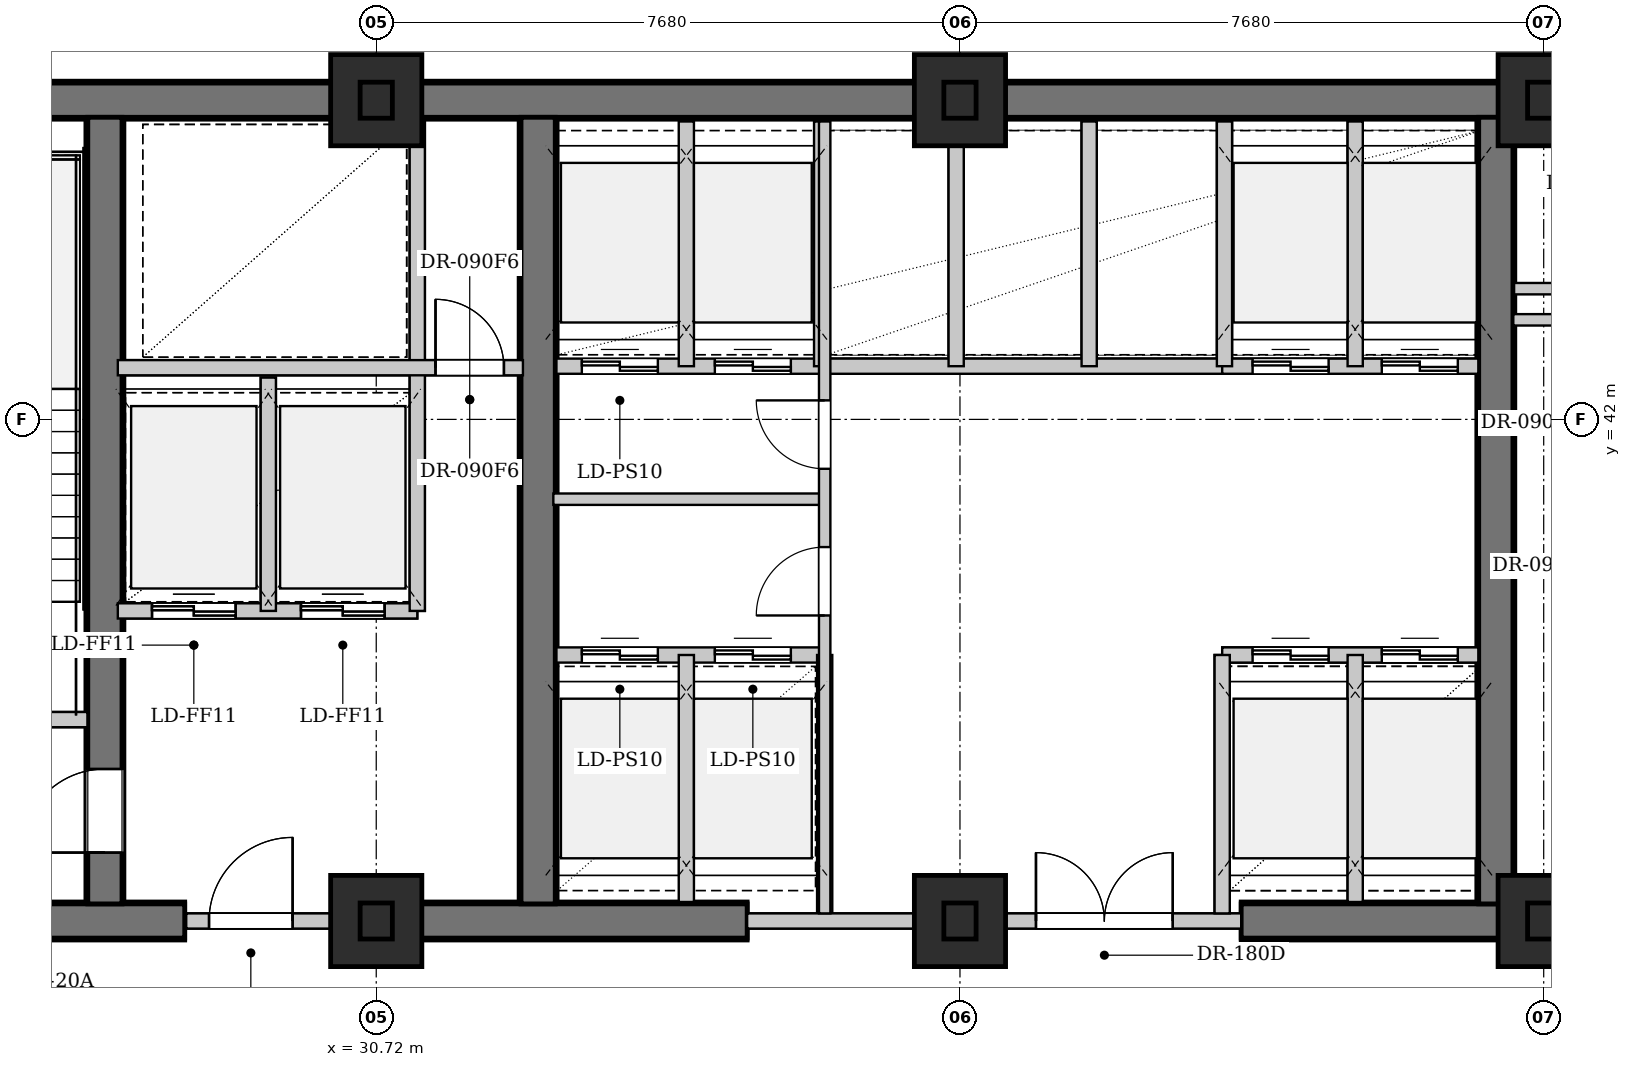
"""IFC4 building model, lengths in metres.
Left out: names, types, materials, properties, quantities, classifications, styles, units other than length and angle.
Written with IfcOpenShell. Run it as: python <this file> out.ifc"""

import sys

from ifc_helpers import new_model, si_unit, direction, frame, frame_2d, origin, origin_2d, place, context, subcontext, project, spatial, rectangle, extrude, element, fill, save


model = new_model("IFC4")
c1 = context("Model", 3, precision=1e-05, world=origin(), true_north=direction((0.0, 1.0)))
c2 = subcontext(c1, "Body", "Model", "MODEL_VIEW")
j1 = project(units=[si_unit("LENGTHUNIT", "METRE"), si_unit("PLANEANGLEUNIT", "RADIAN")], contexts=[c1])
p1 = place(None, origin())
s1 = spatial("IfcSite", under=j1, at=p1, CompositionType="ELEMENT")
p2 = place(p1, origin())
s2 = spatial("IfcBuilding", under=s1, at=p2, CompositionType="ELEMENT")
p3 = place(p2, frame((0.0, 0.0, 78.0)))
s3 = spatial("IfcBuildingStorey", under=s2, at=p3, CompositionType="ELEMENT", Elevation=78.0)
p4 = place(p3, frame((22.79, 46.2, 0.0), z_axis=(0.0, 0.0, 1.0), x_axis=(1.0, 0.0, 0.0)))
e1 = element("IfcWall", 1, at=p4, inside=s3, PredefinedType="SHEAR", context=c2, shape_type="SweptSolid", body=[
    extrude(rectangle(XDim=31.22, YDim=0.5, at=frame_2d((15.61, 0.0))), origin(), (0.0, 0.0, 1.0), 3.68),
])
p5 = place(p3, frame((22.79, 35.4, 0.0), z_axis=(0.0, 0.0, 1.0), x_axis=(1.0, 0.0, 0.0)))
e2 = element("IfcWall", 2, at=p5, inside=s3, PredefinedType="SHEAR", context=c2, shape_type="SweptSolid", body=[
    extrude(rectangle(XDim=5.41, YDim=0.5, at=frame_2d((2.705, 0.0))), origin(), (0.0, 0.0, 1.0), 3.68),
])
p6 = place(p3, frame((30.72, 35.4, 0.0), z_axis=(0.0, 0.0, 1.0), x_axis=(1.0, 0.0, 0.0)))
e3 = element("IfcWall", 3, at=p6, inside=s3, PredefinedType="SHEAR", context=c2, shape_type="SweptSolid", body=[
    extrude(rectangle(XDim=4.88, YDim=0.5, at=frame_2d((2.44, 0.0))), origin(), (0.0, 0.0, 1.0), 3.68),
])
p7 = place(p3, frame((42.1, 35.4, 0.0), z_axis=(0.0, 0.0, 1.0), x_axis=(1.0, 0.0, 0.0)))
e4 = element("IfcWall", 4, at=p7, inside=s3, PredefinedType="SHEAR", context=c2, shape_type="SweptSolid", body=[
    extrude(rectangle(XDim=8.05, YDim=0.5, at=frame_2d((4.025, 0.0))), origin(), (0.0, 0.0, 1.0), 3.68),
])
p8 = place(p7, frame((4.85, 0.0, 0.0)))
e5 = element("IfcOpeningElement", 5, at=p8, cuts=e4, PredefinedType="OPENING", context=c2, shape_type="SweptSolid", body=[
    extrude(rectangle(XDim=0.9, YDim=2.15, at=frame_2d((0.45, 1.075))), frame((0.0, 0.26, 0.0), z_axis=(0.0, -1.0, 0.0), x_axis=(1.0, 0.0, 0.0)), (0.0, 0.0, 1.0), 0.52),
])
p9 = place(p3, frame((27.15, 35.65, 0.0), z_axis=(0.0, 0.0, 1.0), x_axis=(0.0, 1.0, 0.0)))
e6 = element("IfcWall", 6, at=p9, inside=s3, PredefinedType="SHEAR", context=c2, shape_type="SweptSolid", body=[
    extrude(rectangle(XDim=10.3, YDim=0.5, at=frame_2d((5.15, 0.0))), origin(), (0.0, 0.0, 1.0), 3.68),
])
p10 = place(p9, frame((0.65, 0.0, 0.0)))
e7 = element("IfcOpeningElement", 7, at=p10, cuts=e6, PredefinedType="OPENING", context=c2, shape_type="SweptSolid", body=[
    extrude(rectangle(XDim=1.1, YDim=2.15, at=frame_2d((0.55, 1.075))), frame((0.0, 0.26, 0.0), z_axis=(0.0, -1.0, 0.0), x_axis=(1.0, 0.0, 0.0)), (0.0, 0.0, 1.0), 0.52),
])
for number, where, z_axis, x_axis in (
    (8, (32.85, 35.65, 0.0), (0.0, 0.0, 1.0), (0.0, 1.0, 0.0)),
    (9, (45.45, 35.65, 0.0), (0.0, 0.0, 1.0), (0.0, 1.0, 0.0)),
):
    element("IfcWall", number, at=place(p3, frame(where, z_axis=z_axis, x_axis=x_axis)), inside=s3, PredefinedType="SHEAR", context=c2, shape_type="SweptSolid", body=[
        extrude(rectangle(XDim=10.3, YDim=0.5, at=frame_2d((5.15, 0.0))), origin(), (0.0, 0.0, 1.0), 3.68),
    ])
for number, where, z_axis, x_axis in (
    (10, (30.72, 35.4, 0.0), (0.0, 0.0, 1.0), (1.0, 0.0, 0.0)),
    (11, (30.72, 46.2, 0.0), (0.0, 0.0, 1.0), (1.0, 0.0, 0.0)),
    (12, (38.4, 35.4, 0.0), (0.0, 0.0, 1.0), (1.0, 0.0, 0.0)),
    (13, (38.4, 46.2, 0.0), (0.0, 0.0, 1.0), (1.0, 0.0, 0.0)),
    (14, (46.08, 35.4, 0.0), (0.0, 0.0, 1.0), (1.0, 0.0, 0.0)),
    (15, (46.08, 46.2, 0.0), (0.0, 0.0, 1.0), (1.0, 0.0, 0.0)),
):
    element("IfcColumn", number, at=place(p3, frame(where, z_axis=z_axis, x_axis=x_axis)), inside=s3, PredefinedType="COLUMN", context=c2, shape_type="SweptSolid", body=[
        extrude(rectangle(XDim=1.2, YDim=1.2, at=origin_2d()), origin(), (0.0, 0.0, 1.0), 3.9),
    ])
p11 = place(p3, frame((23.3, 38.05, 0.0), z_axis=(0.0, 0.0, 1.0), x_axis=(1.0, 0.0, 0.0)))
e16 = element("IfcWall", 16, at=p11, inside=s3, PredefinedType="PARTITIONING", context=c2, shape_type="SweptSolid", body=[
    extrude(rectangle(XDim=3.62, YDim=0.2, at=frame_2d((1.81, 0.0))), origin(), (0.0, 0.0, 1.0), 3.68),
])
p12 = place(p11, frame((1.26, 0.0, 0.0)))
e17 = element("IfcOpeningElement", 17, at=p12, cuts=e16, PredefinedType="OPENING", context=c2, shape_type="SweptSolid", body=[
    extrude(rectangle(XDim=1.1, YDim=2.15, at=frame_2d((0.55, 1.075))), frame((0.0, 0.11, 0.0), z_axis=(0.0, -1.0, 0.0), x_axis=(1.0, 0.0, 0.0)), (0.0, 0.0, 1.0), 0.22),
])
p13 = place(p3, frame((28.22, 35.4, 0.0), z_axis=(0.0, 0.0, 1.0), x_axis=(1.0, 0.0, 0.0)))
e18 = element("IfcWall", 18, at=p13, inside=s3, PredefinedType="PARTITIONING", context=c2, shape_type="SweptSolid", body=[
    extrude(rectangle(XDim=2.5, YDim=0.2, at=frame_2d((1.25, 0.0))), origin(), (0.0, 0.0, 1.0), 2.765),
])
p14 = place(p13, frame((0.3, 0.0, 0.0)))
e19 = element("IfcOpeningElement", 19, at=p14, cuts=e18, PredefinedType="OPENING", context=c2, shape_type="SweptSolid", body=[
    extrude(rectangle(XDim=1.1, YDim=2.15, at=frame_2d((0.55, 1.075))), frame((0.0, 0.11, 0.0), z_axis=(0.0, -1.0, 0.0), x_axis=(1.0, 0.0, 0.0)), (0.0, 0.0, 1.0), 0.22),
])
p15 = place(p3, frame((27.32, 39.48, 0.0), z_axis=(0.0, 0.0, 1.0), x_axis=(1.0, 0.0, 0.0)))
e20 = element("IfcWall", 20, at=p15, inside=s3, PredefinedType="PARTITIONING", context=c2, shape_type="SweptSolid", body=[
    extrude(rectangle(XDim=3.94, YDim=0.2, at=frame_2d((1.97, 0.0))), origin(), (0.0, 0.0, 1.0), 3.68),
])
p16 = place(p15, frame((0.45, 0.0, 0.0)))
e21 = element("IfcOpeningElement", 21, at=p16, cuts=e20, PredefinedType="OPENING", context=c2, shape_type="SweptSolid", body=[
    extrude(rectangle(XDim=1.1, YDim=2.2, at=frame_2d((0.55, 1.1))), frame((0.0, 0.11, 0.0), z_axis=(0.0, -1.0, 0.0), x_axis=(1.0, 0.0, 0.0)), (0.0, 0.0, 1.0), 0.22),
])
p17 = place(p15, frame((2.41, 0.0, 0.0)))
e22 = element("IfcOpeningElement", 22, at=p17, cuts=e20, PredefinedType="OPENING", context=c2, shape_type="SweptSolid", body=[
    extrude(rectangle(XDim=1.1, YDim=2.2, at=frame_2d((0.55, 1.1))), frame((0.0, 0.11, 0.0), z_axis=(0.0, -1.0, 0.0), x_axis=(1.0, 0.0, 0.0)), (0.0, 0.0, 1.0), 0.22),
])
p18 = place(p3, frame((29.3, 39.48, 0.0), z_axis=(0.0, 0.0, 1.0), x_axis=(0.0, 1.0, 0.0)))
e23 = element("IfcWall", 23, at=p18, inside=s3, PredefinedType="PARTITIONING", context=c2, shape_type="SweptSolid", body=[
    extrude(rectangle(XDim=3.07, YDim=0.2, at=frame_2d((1.535, 0.0))), origin(), (0.0, 0.0, 1.0), 3.68),
])
p19 = place(p3, frame((31.26, 39.48, 0.0), z_axis=(0.0, 0.0, 1.0), x_axis=(0.0, 1.0, 0.0)))
e24 = element("IfcWall", 24, at=p19, inside=s3, PredefinedType="PARTITIONING", context=c2, shape_type="SweptSolid", body=[
    extrude(rectangle(XDim=6.44, YDim=0.2, at=frame_2d((3.22, 0.0))), origin(), (0.0, 0.0, 1.0), 3.68),
])
p20 = place(p3, frame((27.32, 42.68, 0.0), z_axis=(0.0, 0.0, 1.0), x_axis=(1.0, 0.0, 0.0)))
e25 = element("IfcWall", 25, at=p20, inside=s3, PredefinedType="PARTITIONING", context=c2, shape_type="SweptSolid", body=[
    extrude(rectangle(XDim=5.33, YDim=0.2, at=frame_2d((2.665, 0.0))), origin(), (0.0, 0.0, 1.0), 3.68),
])
p21 = place(p20, frame((4.18, 0.0, 0.0)))
e26 = element("IfcOpeningElement", 26, at=p21, cuts=e25, PredefinedType="OPENING", context=c2, shape_type="SweptSolid", body=[
    extrude(rectangle(XDim=0.9, YDim=2.15, at=frame_2d((0.45, 1.075))), frame((0.0, 0.11, 0.0), z_axis=(0.0, -1.0, 0.0), x_axis=(1.0, 0.0, 0.0)), (0.0, 0.0, 1.0), 0.22),
])
p22 = place(p3, frame((35.6, 35.4, 0.0), z_axis=(0.0, 0.0, 1.0), x_axis=(1.0, 0.0, 0.0)))
e27 = element("IfcWall", 27, at=p22, inside=s3, PredefinedType="PARTITIONING", context=c2, shape_type="SweptSolid", body=[
    extrude(rectangle(XDim=6.5, YDim=0.2, at=frame_2d((3.25, 0.0))), origin(), (0.0, 0.0, 1.0), 2.765),
])
p23 = place(p22, frame((3.8, 0.0, 0.0)))
e28 = element("IfcOpeningElement", 28, at=p23, cuts=e27, PredefinedType="OPENING", context=c2, shape_type="SweptSolid", body=[
    extrude(rectangle(XDim=1.8, YDim=2.3, at=frame_2d((0.9, 1.15))), frame((0.0, 0.11, 0.0), z_axis=(0.0, -1.0, 0.0), x_axis=(1.0, 0.0, 0.0)), (0.0, 0.0, 1.0), 0.22),
])
p24 = place(p3, frame((36.6, 42.7, 0.0), z_axis=(0.0, 0.0, 1.0), x_axis=(1.0, 0.0, 0.0)))
e29 = element("IfcWall", 29, at=p24, inside=s3, PredefinedType="PARTITIONING", context=c2, shape_type="SweptSolid", body=[
    extrude(rectangle(XDim=5.25, YDim=0.2, at=frame_2d((2.625, 0.0))), origin(), (0.0, 0.0, 1.0), 3.68),
])
p25 = place(p3, frame((38.35, 42.7, 0.0), z_axis=(0.0, 0.0, 1.0), x_axis=(0.0, 1.0, 0.0)))
e30 = element("IfcWall", 30, at=p25, inside=s3, PredefinedType="PARTITIONING", context=c2, shape_type="SweptSolid", body=[
    extrude(rectangle(XDim=3.22, YDim=0.2, at=frame_2d((1.61, 0.0))), origin(), (0.0, 0.0, 1.0), 2.765),
])
p26 = place(p3, frame((40.1, 42.7, 0.0), z_axis=(0.0, 0.0, 1.0), x_axis=(0.0, 1.0, 0.0)))
e31 = element("IfcWall", 31, at=p26, inside=s3, PredefinedType="PARTITIONING", context=c2, shape_type="SweptSolid", body=[
    extrude(rectangle(XDim=3.22, YDim=0.2, at=frame_2d((1.61, 0.0))), origin(), (0.0, 0.0, 1.0), 3.68),
])
p27 = place(p3, frame((33.05, 38.9, 0.0), z_axis=(0.0, 0.0, 1.0), x_axis=(1.0, 0.0, 0.0)))
e32 = element("IfcWall", 32, at=p27, inside=s3, PredefinedType="PARTITIONING", context=c2, shape_type="SweptSolid", body=[
    extrude(rectangle(XDim=3.57, YDim=0.2, at=frame_2d((1.785, 0.0))), origin(), (0.0, 0.0, 1.0), 3.68),
])
p28 = place(p27, frame((0.375, 0.0, 0.0)))
e33 = element("IfcOpeningElement", 33, at=p28, cuts=e32, PredefinedType="OPENING", context=c2, shape_type="SweptSolid", body=[
    extrude(rectangle(XDim=1.0, YDim=2.2, at=frame_2d((0.5, 1.1))), frame((0.0, 0.11, 0.0), z_axis=(0.0, -1.0, 0.0), x_axis=(1.0, 0.0, 0.0)), (0.0, 0.0, 1.0), 0.22),
])
p29 = place(p27, frame((2.125, 0.0, 0.0)))
e34 = element("IfcOpeningElement", 34, at=p29, cuts=e32, PredefinedType="OPENING", context=c2, shape_type="SweptSolid", body=[
    extrude(rectangle(XDim=1.0, YDim=2.2, at=frame_2d((0.5, 1.1))), frame((0.0, 0.11, 0.0), z_axis=(0.0, -1.0, 0.0), x_axis=(1.0, 0.0, 0.0)), (0.0, 0.0, 1.0), 0.22),
])
p30 = place(p3, frame((33.05, 42.7, 0.0), z_axis=(0.0, 0.0, 1.0), x_axis=(1.0, 0.0, 0.0)))
e35 = element("IfcWall", 35, at=p30, inside=s3, PredefinedType="PARTITIONING", context=c2, shape_type="SweptSolid", body=[
    extrude(rectangle(XDim=3.57, YDim=0.2, at=frame_2d((1.785, 0.0))), origin(), (0.0, 0.0, 1.0), 3.68),
])
p31 = place(p30, frame((0.375, 0.0, 0.0)))
e36 = element("IfcOpeningElement", 36, at=p31, cuts=e35, PredefinedType="OPENING", context=c2, shape_type="SweptSolid", body=[
    extrude(rectangle(XDim=1.0, YDim=2.2, at=frame_2d((0.5, 1.1))), frame((0.0, 0.11, 0.0), z_axis=(0.0, -1.0, 0.0), x_axis=(1.0, 0.0, 0.0)), (0.0, 0.0, 1.0), 0.22),
])
p32 = place(p30, frame((2.125, 0.0, 0.0)))
e37 = element("IfcOpeningElement", 37, at=p32, cuts=e35, PredefinedType="OPENING", context=c2, shape_type="SweptSolid", body=[
    extrude(rectangle(XDim=1.0, YDim=2.2, at=frame_2d((0.5, 1.1))), frame((0.0, 0.11, 0.0), z_axis=(0.0, -1.0, 0.0), x_axis=(1.0, 0.0, 0.0)), (0.0, 0.0, 1.0), 0.22),
])
p33 = place(p3, frame((34.8, 35.65, 0.0), z_axis=(0.0, 0.0, 1.0), x_axis=(0.0, 1.0, 0.0)))
e38 = element("IfcWall", 38, at=p33, inside=s3, PredefinedType="PARTITIONING", context=c2, shape_type="SweptSolid", body=[
    extrude(rectangle(XDim=3.25, YDim=0.2, at=frame_2d((1.625, 0.0))), origin(), (0.0, 0.0, 1.0), 3.68),
])
p34 = place(p3, frame((34.8, 42.7, 0.0), z_axis=(0.0, 0.0, 1.0), x_axis=(0.0, 1.0, 0.0)))
e39 = element("IfcWall", 39, at=p34, inside=s3, PredefinedType="PARTITIONING", context=c2, shape_type="SweptSolid", body=[
    extrude(rectangle(XDim=3.22, YDim=0.2, at=frame_2d((1.61, 0.0))), origin(), (0.0, 0.0, 1.0), 3.68),
])
p35 = place(p3, frame((36.62, 35.5, 0.0), z_axis=(0.0, 0.0, 1.0), x_axis=(0.0, 1.0, 0.0)))
e40 = element("IfcWall", 40, at=p35, inside=s3, PredefinedType="PARTITIONING", context=c2, shape_type="SweptSolid", body=[
    extrude(rectangle(XDim=3.4, YDim=0.2, at=frame_2d((1.7, 0.0))), origin(), (0.0, 0.0, 1.0), 3.68),
])
p36 = place(p3, frame((36.58, 42.7, 0.0), z_axis=(0.0, 0.0, 1.0), x_axis=(0.0, 1.0, 0.0)))
e41 = element("IfcWall", 41, at=p36, inside=s3, PredefinedType="PARTITIONING", context=c2, shape_type="SweptSolid", body=[
    extrude(rectangle(XDim=3.22, YDim=0.2, at=frame_2d((1.61, 0.0))), origin(), (0.0, 0.0, 1.0), 3.68),
])
for number, where, z_axis, x_axis in (
    (42, (41.85, 38.9, 0.0), (0.0, 0.0, 1.0), (1.0, 0.0, 0.0)),
    (43, (41.85, 42.7, 0.0), (0.0, 0.0, 1.0), (1.0, 0.0, 0.0)),
):
    element("IfcWall", number, at=place(p3, frame(where, z_axis=z_axis, x_axis=x_axis)), inside=s3, PredefinedType="PARTITIONING", context=c2, shape_type="SweptSolid", body=[
        extrude(rectangle(XDim=3.37, YDim=0.2, at=frame_2d((1.685, 0.0))), origin(), (0.0, 0.0, 1.0), 3.68),
    ])
p37 = place(p3, frame((43.6, 35.65, 0.0), z_axis=(0.0, 0.0, 1.0), x_axis=(0.0, 1.0, 0.0)))
e44 = element("IfcWall", 44, at=p37, inside=s3, PredefinedType="PARTITIONING", context=c2, shape_type="SweptSolid", body=[
    extrude(rectangle(XDim=3.25, YDim=0.2, at=frame_2d((1.625, 0.0))), origin(), (0.0, 0.0, 1.0), 3.68),
])
p38 = place(p3, frame((43.6, 42.7, 0.0), z_axis=(0.0, 0.0, 1.0), x_axis=(0.0, 1.0, 0.0)))
e45 = element("IfcWall", 45, at=p38, inside=s3, PredefinedType="PARTITIONING", context=c2, shape_type="SweptSolid", body=[
    extrude(rectangle(XDim=3.22, YDim=0.2, at=frame_2d((1.61, 0.0))), origin(), (0.0, 0.0, 1.0), 3.68),
])
p39 = place(p3, frame((41.85, 35.5, 0.0), z_axis=(0.0, 0.0, 1.0), x_axis=(0.0, 1.0, 0.0)))
e46 = element("IfcWall", 46, at=p39, inside=s3, PredefinedType="PARTITIONING", context=c2, shape_type="SweptSolid", body=[
    extrude(rectangle(XDim=3.4, YDim=0.2, at=frame_2d((1.7, 0.0))), origin(), (0.0, 0.0, 1.0), 3.68),
])
p40 = place(p3, frame((41.88, 42.7, 0.0), z_axis=(0.0, 0.0, 1.0), x_axis=(0.0, 1.0, 0.0)))
e47 = element("IfcWall", 47, at=p40, inside=s3, PredefinedType="PARTITIONING", context=c2, shape_type="SweptSolid", body=[
    extrude(rectangle(XDim=3.22, YDim=0.2, at=frame_2d((1.61, 0.0))), origin(), (0.0, 0.0, 1.0), 3.68),
])
p41 = place(p3, frame((45.68, 43.72, 0.0), z_axis=(0.0, 0.0, 1.0), x_axis=(1.0, 0.0, 0.0)))
e48 = element("IfcWall", 48, at=p41, inside=s3, PredefinedType="PARTITIONING", context=c2, shape_type="SweptSolid", body=[
    extrude(rectangle(XDim=4.5, YDim=0.15, at=frame_2d((2.25, 0.0))), origin(), (0.0, 0.0, 1.0), 3.68),
])
p42 = place(p41, frame((0.55, 0.0, 0.0)))
e49 = element("IfcOpeningElement", 49, at=p42, cuts=e48, PredefinedType="OPENING", context=c2, shape_type="SweptSolid", body=[
    extrude(rectangle(XDim=0.95, YDim=2.15, at=frame_2d((0.475, 1.075))), frame((0.0, 0.085, 0.0), z_axis=(0.0, -1.0, 0.0), x_axis=(1.0, 0.0, 0.0)), (0.0, 0.0, 1.0), 0.17),
])
p43 = place(p14, origin())
e50 = element("IfcDoor", 50, at=p43, inside=s3, OperationType="SINGLE_SWING_RIGHT", PredefinedType="DOOR", context=c2, shape_type="SweptSolid", body=[
    extrude(rectangle(XDim=1.1, YDim=2.15, at=frame_2d((0.55, 1.075))), frame((0.0, 0.025, 0.0), z_axis=(0.0, -1.0, 0.0), x_axis=(1.0, 0.0, 0.0)), (0.0, 0.0, 1.0), 0.05),
])
fill(e19, e50)
p44 = place(p16, origin())
e51 = element("IfcDoor", 51, at=p44, inside=s3, OperationType="DOUBLE_DOOR_SLIDING", PredefinedType="DOOR", context=c2, shape_type="SweptSolid", body=[
    extrude(rectangle(XDim=1.1, YDim=2.2, at=frame_2d((0.55, 1.1))), frame((0.0, 0.025, 0.0), z_axis=(0.0, -1.0, 0.0), x_axis=(1.0, 0.0, 0.0)), (0.0, 0.0, 1.0), 0.05),
])
fill(e21, e51)
p45 = place(p17, origin())
e52 = element("IfcDoor", 52, at=p45, inside=s3, OperationType="DOUBLE_DOOR_SLIDING", PredefinedType="DOOR", context=c2, shape_type="SweptSolid", body=[
    extrude(rectangle(XDim=1.1, YDim=2.2, at=frame_2d((0.55, 1.1))), frame((0.0, 0.025, 0.0), z_axis=(0.0, -1.0, 0.0), x_axis=(1.0, 0.0, 0.0)), (0.0, 0.0, 1.0), 0.05),
])
fill(e22, e52)
p46 = place(p21, origin())
e53 = element("IfcDoor", 53, at=p46, inside=s3, OperationType="SINGLE_SWING_LEFT", PredefinedType="DOOR", context=c2, shape_type="SweptSolid", body=[
    extrude(rectangle(XDim=0.9, YDim=2.15, at=frame_2d((0.45, 1.075))), frame((0.0, 0.025, 0.0), z_axis=(0.0, -1.0, 0.0), x_axis=(1.0, 0.0, 0.0)), (0.0, 0.0, 1.0), 0.05),
])
fill(e26, e53)
p47 = place(p23, origin())
e54 = element("IfcDoor", 54, at=p47, inside=s3, OperationType="DOUBLE_DOOR_SINGLE_SWING", PredefinedType="DOOR", context=c2, shape_type="SweptSolid", body=[
    extrude(rectangle(XDim=1.8, YDim=2.3, at=frame_2d((0.9, 1.15))), frame((0.0, 0.025, 0.0), z_axis=(0.0, -1.0, 0.0), x_axis=(1.0, 0.0, 0.0)), (0.0, 0.0, 1.0), 0.05),
])
fill(e28, e54)
p48 = place(p28, origin())
e55 = element("IfcDoor", 55, at=p48, inside=s3, OperationType="DOUBLE_DOOR_SLIDING", PredefinedType="DOOR", context=c2, shape_type="SweptSolid", body=[
    extrude(rectangle(XDim=1.0, YDim=2.2, at=frame_2d((0.5, 1.1))), frame((0.0, 0.025, 0.0), z_axis=(0.0, -1.0, 0.0), x_axis=(1.0, 0.0, 0.0)), (0.0, 0.0, 1.0), 0.05),
])
fill(e33, e55)
p49 = place(p29, origin())
e56 = element("IfcDoor", 56, at=p49, inside=s3, OperationType="DOUBLE_DOOR_SLIDING", PredefinedType="DOOR", context=c2, shape_type="SweptSolid", body=[
    extrude(rectangle(XDim=1.0, YDim=2.2, at=frame_2d((0.5, 1.1))), frame((0.0, 0.025, 0.0), z_axis=(0.0, -1.0, 0.0), x_axis=(1.0, 0.0, 0.0)), (0.0, 0.0, 1.0), 0.05),
])
fill(e34, e56)
p50 = place(p31, origin())
e57 = element("IfcDoor", 57, at=p50, inside=s3, OperationType="DOUBLE_DOOR_SLIDING", PredefinedType="DOOR", context=c2, shape_type="SweptSolid", body=[
    extrude(rectangle(XDim=1.0, YDim=2.2, at=frame_2d((0.5, 1.1))), frame((0.0, 0.025, 0.0), z_axis=(0.0, -1.0, 0.0), x_axis=(1.0, 0.0, 0.0)), (0.0, 0.0, 1.0), 0.05),
])
fill(e36, e57)
p51 = place(p32, origin())
e58 = element("IfcDoor", 58, at=p51, inside=s3, OperationType="DOUBLE_DOOR_SLIDING", PredefinedType="DOOR", context=c2, shape_type="SweptSolid", body=[
    extrude(rectangle(XDim=1.0, YDim=2.2, at=frame_2d((0.5, 1.1))), frame((0.0, 0.025, 0.0), z_axis=(0.0, -1.0, 0.0), x_axis=(1.0, 0.0, 0.0)), (0.0, 0.0, 1.0), 0.05),
])
fill(e37, e58)
p52 = place(p10, origin())
e59 = element("IfcDoor", 59, at=p52, inside=s3, OperationType="SINGLE_SWING_LEFT", PredefinedType="DOOR", context=c2, shape_type="SweptSolid", body=[
    extrude(rectangle(XDim=1.1, YDim=2.15, at=frame_2d((0.55, 1.075))), frame((0.0, 0.025, 0.0), z_axis=(0.0, -1.0, 0.0), x_axis=(1.0, 0.0, 0.0)), (0.0, 0.0, 1.0), 0.05),
])
fill(e7, e59)
save(model, sys.argv[1])
